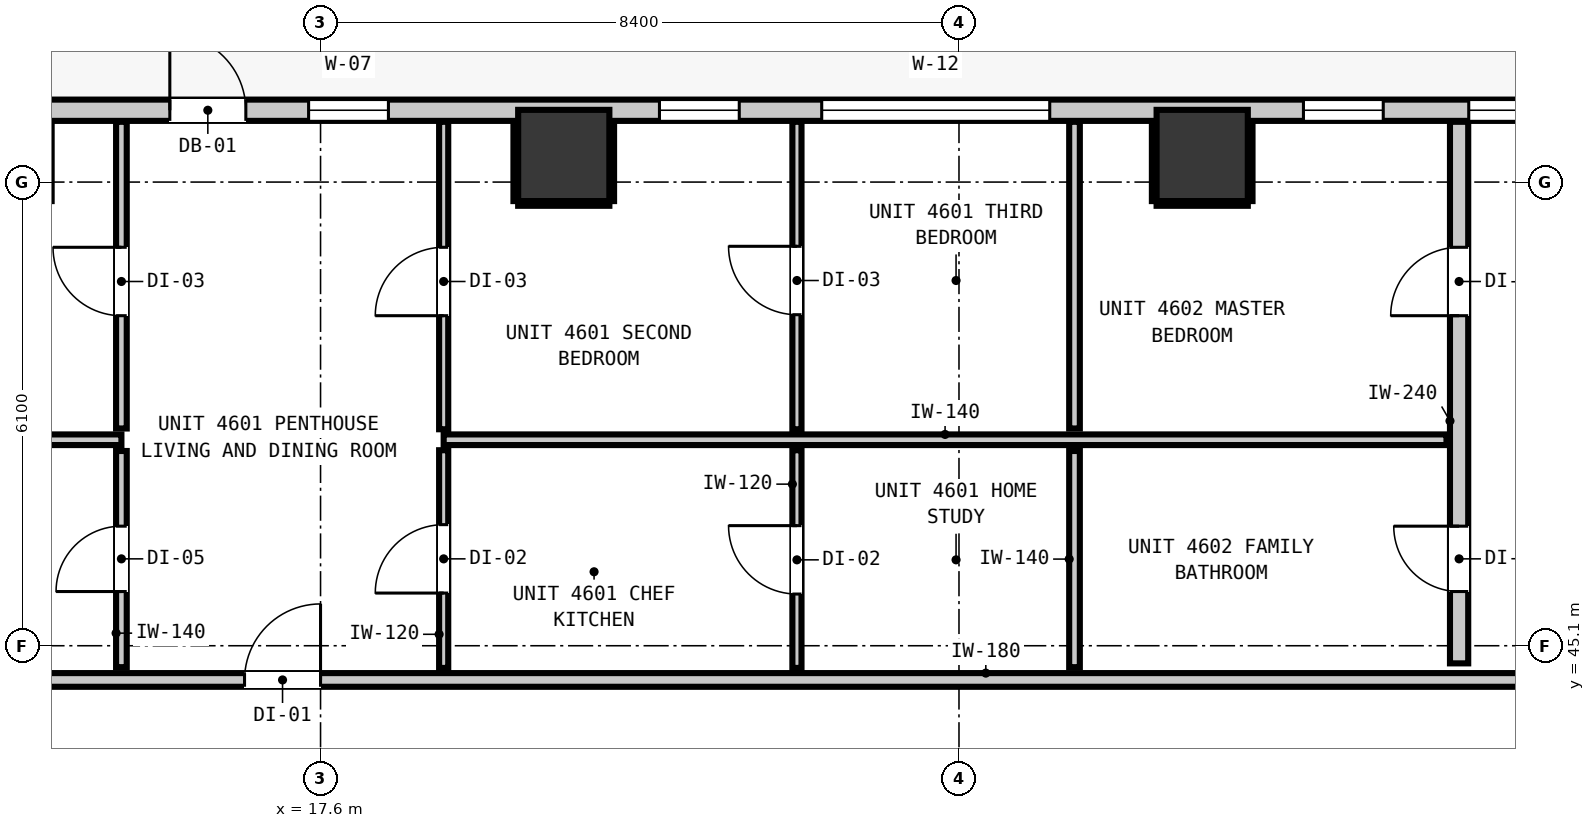
"""IFC4 building model, lengths in metres.
Left out: names, types, materials, properties, quantities, classifications, styles, units other than length and angle.
Written with IfcOpenShell. Run it as: python <this file> out.ifc"""

import sys

from ifc_helpers import new_model, si_unit, direction, frame, frame_2d, origin, origin_2d, place, context, subcontext, project, spatial, rectangle, extrude, element, fill, save


model = new_model("IFC4")
c1 = context("Model", 3, precision=1e-05, world=origin(), true_north=direction((0.0, 1.0)))
c2 = subcontext(c1, "Body", "Model", "MODEL_VIEW")
j1 = project(units=[si_unit("LENGTHUNIT", "METRE"), si_unit("PLANEANGLEUNIT", "RADIAN")], contexts=[c1])
p1 = place(None, origin())
s1 = spatial("IfcSite", under=j1, at=p1, CompositionType="ELEMENT")
p2 = place(p1, origin())
s2 = spatial("IfcBuilding", under=s1, at=p2, CompositionType="ELEMENT")
p3 = place(p2, frame((0.0, 0.0, 159.2)))
s3 = spatial("IfcBuildingStorey", under=s2, at=p3, CompositionType="ELEMENT", Elevation=159.2)
for number, where, z_axis, x_axis in (
    (1, (20.8, 51.55, 0.0), (0.0, 0.0, 1.0), (1.0, 0.0, 0.0)),
    (2, (29.2, 51.55, 0.0), (0.0, 0.0, 1.0), (1.0, 0.0, 0.0)),
):
    element("IfcColumn", number, at=place(p3, frame(where, z_axis=z_axis, x_axis=x_axis)), inside=s3, PredefinedType="COLUMN", context=c2, shape_type="SweptSolid", body=[
        extrude(rectangle(XDim=1.2, YDim=1.2, at=origin_2d()), origin(), (0.0, 0.0, 1.0), 3.32),
    ])
p4 = place(p3, frame((11.555, 52.145, 0.0), z_axis=(0.0, 0.0, 1.0), x_axis=(1.0, 0.0, 0.0)))
e3 = element("IfcWall", 3, at=p4, inside=s3, PredefinedType="STANDARD", context=c2, shape_type="SweptSolid", body=[
    extrude(rectangle(XDim=35.09, YDim=0.28, at=frame_2d((17.545, 0.0))), origin(), (0.0, 0.0, 1.0), 3.08),
])
p5 = place(p4, frame((4.062, 0.0, 0.0)))
e4 = element("IfcOpeningElement", 4, at=p5, cuts=e3, PredefinedType="OPENING", context=c2, shape_type="SweptSolid", body=[
    extrude(rectangle(XDim=1.0, YDim=2.15, at=frame_2d((0.5, 1.075))), frame((0.0, 0.15, 0.0), z_axis=(0.0, -1.0, 0.0), x_axis=(1.0, 0.0, 0.0)), (0.0, 0.0, 1.0), 0.3),
])
p6 = place(p4, frame((5.888, 0.0, 0.85)))
e5 = element("IfcOpeningElement", 5, at=p6, cuts=e3, PredefinedType="OPENING", context=c2, shape_type="SweptSolid", body=[
    extrude(rectangle(XDim=1.05, YDim=1.65, at=frame_2d((0.525, 0.825))), frame((0.0, 0.15, 0.0), z_axis=(0.0, -1.0, 0.0), x_axis=(1.0, 0.0, 0.0)), (0.0, 0.0, 1.0), 0.3),
])
p7 = place(p4, frame((0.378, 0.0, 0.85)))
e6 = element("IfcOpeningElement", 6, at=p7, cuts=e3, PredefinedType="OPENING", context=c2, shape_type="SweptSolid", body=[
    extrude(rectangle(XDim=0.58, YDim=1.5, at=frame_2d((0.29, 0.75))), frame((0.0, 0.15, 0.0), z_axis=(0.0, -1.0, 0.0), x_axis=(1.0, 0.0, 0.0)), (0.0, 0.0, 1.0), 0.3),
])
p8 = place(p4, frame((10.504, 0.0, 0.85)))
e7 = element("IfcOpeningElement", 7, at=p8, cuts=e3, PredefinedType="OPENING", context=c2, shape_type="SweptSolid", body=[
    extrude(rectangle(XDim=1.05, YDim=1.65, at=frame_2d((0.525, 0.825))), frame((0.0, 0.15, 0.0), z_axis=(0.0, -1.0, 0.0), x_axis=(1.0, 0.0, 0.0)), (0.0, 0.0, 1.0), 0.3),
])
p9 = place(p4, frame((12.639, 0.0, 0.85)))
e8 = element("IfcOpeningElement", 8, at=p9, cuts=e3, PredefinedType="OPENING", context=c2, shape_type="SweptSolid", body=[
    extrude(rectangle(XDim=3.0, YDim=2.1, at=frame_2d((1.5, 1.05))), frame((0.0, 0.15, 0.0), z_axis=(0.0, -1.0, 0.0), x_axis=(1.0, 0.0, 0.0)), (0.0, 0.0, 1.0), 0.3),
])
p10 = place(p4, frame((21.152, 0.0, 0.85)))
e9 = element("IfcOpeningElement", 9, at=p10, cuts=e3, PredefinedType="OPENING", context=c2, shape_type="SweptSolid", body=[
    extrude(rectangle(XDim=3.0, YDim=2.1, at=frame_2d((1.5, 1.05))), frame((0.0, 0.15, 0.0), z_axis=(0.0, -1.0, 0.0), x_axis=(1.0, 0.0, 0.0)), (0.0, 0.0, 1.0), 0.3),
])
p11 = place(p4, frame((18.977, 0.0, 0.85)))
e10 = element("IfcOpeningElement", 10, at=p11, cuts=e3, PredefinedType="OPENING", context=c2, shape_type="SweptSolid", body=[
    extrude(rectangle(XDim=1.05, YDim=1.65, at=frame_2d((0.525, 0.825))), frame((0.0, 0.15, 0.0), z_axis=(0.0, -1.0, 0.0), x_axis=(1.0, 0.0, 0.0)), (0.0, 0.0, 1.0), 0.3),
])
p12 = place(p4, frame((28.544, 0.0, 0.85)))
e11 = element("IfcOpeningElement", 11, at=p12, cuts=e3, PredefinedType="OPENING", context=c2, shape_type="SweptSolid", body=[
    extrude(rectangle(XDim=3.0, YDim=2.1, at=frame_2d((1.5, 1.05))), frame((0.0, 0.15, 0.0), z_axis=(0.0, -1.0, 0.0), x_axis=(1.0, 0.0, 0.0)), (0.0, 0.0, 1.0), 0.3),
])
p13 = place(p4, frame((33.447, 0.0, 0.85)))
e12 = element("IfcOpeningElement", 12, at=p13, cuts=e3, PredefinedType="OPENING", context=c2, shape_type="SweptSolid", body=[
    extrude(rectangle(XDim=1.05, YDim=1.65, at=frame_2d((0.525, 0.825))), frame((0.0, 0.15, 0.0), z_axis=(0.0, -1.0, 0.0), x_axis=(1.0, 0.0, 0.0)), (0.0, 0.0, 1.0), 0.3),
])
p14 = place(p3, frame((9.407, 44.65, 0.0), z_axis=(0.0, 0.0, 1.0), x_axis=(1.0, 0.0, 0.0)))
e13 = element("IfcWall", 13, at=p14, inside=s3, PredefinedType="PARTITIONING", context=c2, shape_type="SweptSolid", body=[
    extrude(rectangle(XDim=39.386, YDim=0.18, at=frame_2d((19.693, 0.0))), origin(), (0.0, 0.0, 1.0), 3.08),
])
p15 = place(p14, frame((7.193, 0.0, 0.0)))
e14 = element("IfcOpeningElement", 14, at=p15, cuts=e13, PredefinedType="OPENING", context=c2, shape_type="SweptSolid", body=[
    extrude(rectangle(XDim=1.0, YDim=2.15, at=frame_2d((0.5, 1.075))), frame((0.0, 0.1, 0.0), z_axis=(0.0, -1.0, 0.0), x_axis=(1.0, 0.0, 0.0)), (0.0, 0.0, 1.0), 0.2),
])
p16 = place(p14, frame((25.699, 0.0, 0.0)))
e15 = element("IfcOpeningElement", 15, at=p16, cuts=e13, PredefinedType="OPENING", context=c2, shape_type="SweptSolid", body=[
    extrude(rectangle(XDim=1.0, YDim=2.15, at=frame_2d((0.5, 1.075))), frame((0.0, 0.1, 0.0), z_axis=(0.0, -1.0, 0.0), x_axis=(1.0, 0.0, 0.0)), (0.0, 0.0, 1.0), 0.2),
])
p17 = place(p3, frame((9.407, 47.81, 0.0), z_axis=(0.0, 0.0, 1.0), x_axis=(1.0, 0.0, 0.0)))
e16 = element("IfcWall", 16, at=p17, inside=s3, PredefinedType="PARTITIONING", context=c2, shape_type="SweptSolid", body=[
    extrude(rectangle(XDim=5.573, YDim=0.14, at=frame_2d((2.787, 0.0))), origin(), (0.0, 0.0, 1.0), 3.08),
])
p18 = place(p3, frame((19.22, 47.81, 0.0), z_axis=(0.0, 0.0, 1.0), x_axis=(1.0, 0.0, 0.0)))
e17 = element("IfcWall", 17, at=p18, inside=s3, PredefinedType="PARTITIONING", context=c2, shape_type="SweptSolid", body=[
    extrude(rectangle(XDim=13.194, YDim=0.14, at=frame_2d((6.597, 0.0))), origin(), (0.0, 0.0, 1.0), 3.08),
])
p19 = place(p3, frame((32.58, 44.868, 0.0), z_axis=(0.0, 0.0, 1.0), x_axis=(0.0, 1.0, 0.0)))
e18 = element("IfcWall", 18, at=p19, inside=s3, PredefinedType="PARTITIONING", context=c2, shape_type="SweptSolid", body=[
    extrude(rectangle(XDim=7.125, YDim=0.24, at=frame_2d((3.562, 0.0))), origin(), (0.0, 0.0, 1.0), 3.08),
])
p20 = place(p19, frame((0.945, 0.0, 0.0)))
e19 = element("IfcOpeningElement", 19, at=p20, cuts=e18, PredefinedType="OPENING", context=c2, shape_type="SweptSolid", body=[
    extrude(rectangle(XDim=0.86, YDim=2.02, at=frame_2d((0.43, 1.01))), frame((0.0, 0.13, 0.0), z_axis=(0.0, -1.0, 0.0), x_axis=(1.0, 0.0, 0.0)), (0.0, 0.0, 1.0), 0.26),
])
p21 = place(p19, frame((4.574, 0.0, 0.0)))
e20 = element("IfcOpeningElement", 20, at=p21, cuts=e18, PredefinedType="OPENING", context=c2, shape_type="SweptSolid", body=[
    extrude(rectangle(XDim=0.9, YDim=2.1, at=frame_2d((0.45, 1.05))), frame((0.0, 0.13, 0.0), z_axis=(0.0, -1.0, 0.0), x_axis=(1.0, 0.0, 0.0)), (0.0, 0.0, 1.0), 0.26),
])
p22 = place(p3, frame((14.98, 44.818, 0.0), z_axis=(0.0, 0.0, 1.0), x_axis=(0.0, 1.0, 0.0)))
e21 = element("IfcWall", 21, at=p22, inside=s3, PredefinedType="PARTITIONING", context=c2, shape_type="SweptSolid", body=[
    extrude(rectangle(XDim=2.844, YDim=0.14, at=frame_2d((1.422, 0.0))), origin(), (0.0, 0.0, 1.0), 3.08),
])
p23 = place(p22, frame((0.995, 0.0, 0.0)))
e22 = element("IfcOpeningElement", 22, at=p23, cuts=e21, PredefinedType="OPENING", context=c2, shape_type="SweptSolid", body=[
    extrude(rectangle(XDim=0.86, YDim=2.02, at=frame_2d((0.43, 1.01))), frame((0.0, 0.08, 0.0), z_axis=(0.0, -1.0, 0.0), x_axis=(1.0, 0.0, 0.0)), (0.0, 0.0, 1.0), 0.16),
])
p24 = place(p3, frame((14.98, 47.958, 0.0), z_axis=(0.0, 0.0, 1.0), x_axis=(0.0, 1.0, 0.0)))
e23 = element("IfcWall", 23, at=p24, inside=s3, PredefinedType="PARTITIONING", context=c2, shape_type="SweptSolid", body=[
    extrude(rectangle(XDim=4.035, YDim=0.14, at=frame_2d((2.018, 0.0))), origin(), (0.0, 0.0, 1.0), 3.08),
])
p25 = place(p24, frame((1.484, 0.0, 0.0)))
e24 = element("IfcOpeningElement", 24, at=p25, cuts=e23, PredefinedType="OPENING", context=c2, shape_type="SweptSolid", body=[
    extrude(rectangle(XDim=0.9, YDim=2.1, at=frame_2d((0.45, 1.05))), frame((0.0, 0.08, 0.0), z_axis=(0.0, -1.0, 0.0), x_axis=(1.0, 0.0, 0.0)), (0.0, 0.0, 1.0), 0.16),
])
p26 = place(p3, frame((27.52, 44.818, 0.0), z_axis=(0.0, 0.0, 1.0), x_axis=(0.0, 1.0, 0.0)))
e25 = element("IfcWall", 25, at=p26, inside=s3, PredefinedType="PARTITIONING", context=c2, shape_type="SweptSolid", body=[
    extrude(rectangle(XDim=2.844, YDim=0.14, at=frame_2d((1.422, 0.0))), origin(), (0.0, 0.0, 1.0), 3.08),
])
p27 = place(p3, frame((27.52, 47.958, 0.0), z_axis=(0.0, 0.0, 1.0), x_axis=(0.0, 1.0, 0.0)))
e26 = element("IfcWall", 26, at=p27, inside=s3, PredefinedType="PARTITIONING", context=c2, shape_type="SweptSolid", body=[
    extrude(rectangle(XDim=4.035, YDim=0.14, at=frame_2d((2.018, 0.0))), origin(), (0.0, 0.0, 1.0), 3.08),
])
p28 = place(p3, frame((19.22, 44.808, 0.0), z_axis=(0.0, 0.0, 1.0), x_axis=(0.0, 1.0, 0.0)))
e27 = element("IfcWall", 27, at=p28, inside=s3, PredefinedType="PARTITIONING", context=c2, shape_type="SweptSolid", body=[
    extrude(rectangle(XDim=2.864, YDim=0.12, at=frame_2d((1.432, 0.0))), origin(), (0.0, 0.0, 1.0), 3.08),
])
p29 = place(p28, frame((0.985, 0.0, 0.0)))
e28 = element("IfcOpeningElement", 28, at=p29, cuts=e27, PredefinedType="OPENING", context=c2, shape_type="SweptSolid", body=[
    extrude(rectangle(XDim=0.9, YDim=2.1, at=frame_2d((0.45, 1.05))), frame((0.0, 0.07, 0.0), z_axis=(0.0, -1.0, 0.0), x_axis=(1.0, 0.0, 0.0)), (0.0, 0.0, 1.0), 0.14),
])
p30 = place(p3, frame((19.22, 47.948, 0.0), z_axis=(0.0, 0.0, 1.0), x_axis=(0.0, 1.0, 0.0)))
e29 = element("IfcWall", 29, at=p30, inside=s3, PredefinedType="PARTITIONING", context=c2, shape_type="SweptSolid", body=[
    extrude(rectangle(XDim=4.045, YDim=0.12, at=frame_2d((2.022, 0.0))), origin(), (0.0, 0.0, 1.0), 3.08),
])
p31 = place(p30, frame((1.494, 0.0, 0.0)))
e30 = element("IfcOpeningElement", 30, at=p31, cuts=e29, PredefinedType="OPENING", context=c2, shape_type="SweptSolid", body=[
    extrude(rectangle(XDim=0.9, YDim=2.1, at=frame_2d((0.45, 1.05))), frame((0.0, 0.07, 0.0), z_axis=(0.0, -1.0, 0.0), x_axis=(1.0, 0.0, 0.0)), (0.0, 0.0, 1.0), 0.14),
])
p32 = place(p3, frame((23.868, 44.808, 0.0), z_axis=(0.0, 0.0, 1.0), x_axis=(0.0, 1.0, 0.0)))
e31 = element("IfcWall", 31, at=p32, inside=s3, PredefinedType="PARTITIONING", context=c2, shape_type="SweptSolid", body=[
    extrude(rectangle(XDim=2.864, YDim=0.12, at=frame_2d((1.432, 0.0))), origin(), (0.0, 0.0, 1.0), 3.08),
])
p33 = place(p32, frame((0.972, 0.0, 0.0)))
e32 = element("IfcOpeningElement", 32, at=p33, cuts=e31, PredefinedType="OPENING", context=c2, shape_type="SweptSolid", body=[
    extrude(rectangle(XDim=0.9, YDim=2.1, at=frame_2d((0.45, 1.05))), frame((0.0, 0.07, 0.0), z_axis=(0.0, -1.0, 0.0), x_axis=(1.0, 0.0, 0.0)), (0.0, 0.0, 1.0), 0.14),
])
p34 = place(p3, frame((23.868, 47.948, 0.0), z_axis=(0.0, 0.0, 1.0), x_axis=(0.0, 1.0, 0.0)))
e33 = element("IfcWall", 33, at=p34, inside=s3, PredefinedType="PARTITIONING", context=c2, shape_type="SweptSolid", body=[
    extrude(rectangle(XDim=4.045, YDim=0.12, at=frame_2d((2.022, 0.0))), origin(), (0.0, 0.0, 1.0), 3.08),
])
p35 = place(p34, frame((1.507, 0.0, 0.0)))
e34 = element("IfcOpeningElement", 34, at=p35, cuts=e33, PredefinedType="OPENING", context=c2, shape_type="SweptSolid", body=[
    extrude(rectangle(XDim=0.9, YDim=2.1, at=frame_2d((0.45, 1.05))), frame((0.0, 0.07, 0.0), z_axis=(0.0, -1.0, 0.0), x_axis=(1.0, 0.0, 0.0)), (0.0, 0.0, 1.0), 0.14),
])
p36 = place(p3, frame((20.2, 50.918, 0.0), z_axis=(0.0, 0.0, 1.0), x_axis=(1.0, 0.0, 0.0)))
e35 = element("IfcWall", 35, at=p36, inside=s3, PredefinedType="PARTITIONING", context=c2, shape_type="SweptSolid", body=[
    extrude(rectangle(XDim=1.2, YDim=0.06, at=frame_2d((0.6, 0.0))), origin(), (0.0, 0.0, 1.0), 1.45),
])
for number, where, z_axis, x_axis in (
    (36, (20.168, 50.95, 0.0), (0.0, 0.0, 1.0), (0.0, 1.0, 0.0)),
    (37, (21.432, 50.95, 0.0), (0.0, 0.0, 1.0), (0.0, 1.0, 0.0)),
):
    element("IfcWall", number, at=place(p3, frame(where, z_axis=z_axis, x_axis=x_axis)), inside=s3, PredefinedType="PARTITIONING", context=c2, shape_type="SweptSolid", body=[
        extrude(rectangle(XDim=1.04, YDim=0.06, at=frame_2d((0.52, 0.0))), origin(), (0.0, 0.0, 1.0), 1.45),
    ])
p37 = place(p3, frame((28.6, 50.918, 0.0), z_axis=(0.0, 0.0, 1.0), x_axis=(1.0, 0.0, 0.0)))
e38 = element("IfcWall", 38, at=p37, inside=s3, PredefinedType="PARTITIONING", context=c2, shape_type="SweptSolid", body=[
    extrude(rectangle(XDim=1.2, YDim=0.06, at=frame_2d((0.6, 0.0))), origin(), (0.0, 0.0, 1.0), 1.45),
])
for number, where, z_axis, x_axis in (
    (39, (28.568, 50.95, 0.0), (0.0, 0.0, 1.0), (0.0, 1.0, 0.0)),
    (40, (29.832, 50.95, 0.0), (0.0, 0.0, 1.0), (0.0, 1.0, 0.0)),
):
    element("IfcWall", number, at=place(p3, frame(where, z_axis=z_axis, x_axis=x_axis)), inside=s3, PredefinedType="PARTITIONING", context=c2, shape_type="SweptSolid", body=[
        extrude(rectangle(XDim=1.04, YDim=0.06, at=frame_2d((0.52, 0.0))), origin(), (0.0, 0.0, 1.0), 1.45),
    ])
p38 = place(p5, origin())
e41 = element("IfcDoor", 41, at=p38, inside=s3, OperationType="SINGLE_SWING_LEFT", PredefinedType="DOOR", context=c2, shape_type="SweptSolid", body=[
    extrude(rectangle(XDim=1.0, YDim=2.15, at=frame_2d((0.5, 1.075))), frame((0.0, 0.025, 0.0), z_axis=(0.0, -1.0, 0.0), x_axis=(1.0, 0.0, 0.0)), (0.0, 0.0, 1.0), 0.05),
])
fill(e4, e41)
p39 = place(p6, origin())
e42 = element("IfcWindow", 42, at=p39, inside=s3, PartitioningType="SINGLE_PANEL", PredefinedType="WINDOW", context=c2, shape_type="SweptSolid", body=[
    extrude(rectangle(XDim=1.05, YDim=1.65, at=frame_2d((0.525, 0.825))), frame((0.0, 0.03, 0.0), z_axis=(0.0, -1.0, 0.0), x_axis=(1.0, 0.0, 0.0)), (0.0, 0.0, 1.0), 0.06),
])
fill(e5, e42)
p40 = place(p8, origin())
e43 = element("IfcWindow", 43, at=p40, inside=s3, PartitioningType="SINGLE_PANEL", PredefinedType="WINDOW", context=c2, shape_type="SweptSolid", body=[
    extrude(rectangle(XDim=1.05, YDim=1.65, at=frame_2d((0.525, 0.825))), frame((0.0, 0.03, 0.0), z_axis=(0.0, -1.0, 0.0), x_axis=(1.0, 0.0, 0.0)), (0.0, 0.0, 1.0), 0.06),
])
fill(e7, e43)
p41 = place(p9, origin())
e44 = element("IfcWindow", 44, at=p41, inside=s3, PartitioningType="SINGLE_PANEL", PredefinedType="WINDOW", context=c2, shape_type="SweptSolid", body=[
    extrude(rectangle(XDim=3.0, YDim=2.1, at=frame_2d((1.5, 1.05))), frame((0.0, 0.03, 0.0), z_axis=(0.0, -1.0, 0.0), x_axis=(1.0, 0.0, 0.0)), (0.0, 0.0, 1.0), 0.06),
])
fill(e8, e44)
p42 = place(p10, origin())
e45 = element("IfcWindow", 45, at=p42, inside=s3, PartitioningType="SINGLE_PANEL", PredefinedType="WINDOW", context=c2, shape_type="SweptSolid", body=[
    extrude(rectangle(XDim=3.0, YDim=2.1, at=frame_2d((1.5, 1.05))), frame((0.0, 0.03, 0.0), z_axis=(0.0, -1.0, 0.0), x_axis=(1.0, 0.0, 0.0)), (0.0, 0.0, 1.0), 0.06),
])
fill(e9, e45)
p43 = place(p11, origin())
e46 = element("IfcWindow", 46, at=p43, inside=s3, PartitioningType="SINGLE_PANEL", PredefinedType="WINDOW", context=c2, shape_type="SweptSolid", body=[
    extrude(rectangle(XDim=1.05, YDim=1.65, at=frame_2d((0.525, 0.825))), frame((0.0, 0.03, 0.0), z_axis=(0.0, -1.0, 0.0), x_axis=(1.0, 0.0, 0.0)), (0.0, 0.0, 1.0), 0.06),
])
fill(e10, e46)
p44 = place(p15, origin())
e47 = element("IfcDoor", 47, at=p44, inside=s3, OperationType="SINGLE_SWING_RIGHT", PredefinedType="DOOR", context=c2, shape_type="SweptSolid", body=[
    extrude(rectangle(XDim=1.0, YDim=2.15, at=frame_2d((0.5, 1.075))), frame((0.0, 0.025, 0.0), z_axis=(0.0, -1.0, 0.0), x_axis=(1.0, 0.0, 0.0)), (0.0, 0.0, 1.0), 0.05),
])
fill(e14, e47)
p45 = place(p23, origin())
e48 = element("IfcDoor", 48, at=p45, inside=s3, OperationType="SINGLE_SWING_LEFT", PredefinedType="DOOR", context=c2, shape_type="SweptSolid", body=[
    extrude(rectangle(XDim=0.86, YDim=2.02, at=frame_2d((0.43, 1.01))), frame((0.0, 0.025, 0.0), z_axis=(0.0, -1.0, 0.0), x_axis=(1.0, 0.0, 0.0)), (0.0, 0.0, 1.0), 0.05),
])
fill(e22, e48)
p46 = place(p25, origin())
e49 = element("IfcDoor", 49, at=p46, inside=s3, OperationType="SINGLE_SWING_RIGHT", PredefinedType="DOOR", context=c2, shape_type="SweptSolid", body=[
    extrude(rectangle(XDim=0.9, YDim=2.1, at=frame_2d((0.45, 1.05))), frame((0.0, 0.025, 0.0), z_axis=(0.0, -1.0, 0.0), x_axis=(1.0, 0.0, 0.0)), (0.0, 0.0, 1.0), 0.05),
])
fill(e24, e49)
p47 = place(p29, origin())
e50 = element("IfcDoor", 50, at=p47, inside=s3, OperationType="SINGLE_SWING_LEFT", PredefinedType="DOOR", context=c2, shape_type="SweptSolid", body=[
    extrude(rectangle(XDim=0.9, YDim=2.1, at=frame_2d((0.45, 1.05))), frame((0.0, 0.025, 0.0), z_axis=(0.0, -1.0, 0.0), x_axis=(1.0, 0.0, 0.0)), (0.0, 0.0, 1.0), 0.05),
])
fill(e28, e50)
p48 = place(p33, origin())
e51 = element("IfcDoor", 51, at=p48, inside=s3, OperationType="SINGLE_SWING_RIGHT", PredefinedType="DOOR", context=c2, shape_type="SweptSolid", body=[
    extrude(rectangle(XDim=0.9, YDim=2.1, at=frame_2d((0.45, 1.05))), frame((0.0, 0.025, 0.0), z_axis=(0.0, -1.0, 0.0), x_axis=(1.0, 0.0, 0.0)), (0.0, 0.0, 1.0), 0.05),
])
fill(e32, e51)
p49 = place(p31, origin())
e52 = element("IfcDoor", 52, at=p49, inside=s3, OperationType="SINGLE_SWING_LEFT", PredefinedType="DOOR", context=c2, shape_type="SweptSolid", body=[
    extrude(rectangle(XDim=0.9, YDim=2.1, at=frame_2d((0.45, 1.05))), frame((0.0, 0.025, 0.0), z_axis=(0.0, -1.0, 0.0), x_axis=(1.0, 0.0, 0.0)), (0.0, 0.0, 1.0), 0.05),
])
fill(e30, e52)
p50 = place(p35, origin())
e53 = element("IfcDoor", 53, at=p50, inside=s3, OperationType="SINGLE_SWING_RIGHT", PredefinedType="DOOR", context=c2, shape_type="SweptSolid", body=[
    extrude(rectangle(XDim=0.9, YDim=2.1, at=frame_2d((0.45, 1.05))), frame((0.0, 0.025, 0.0), z_axis=(0.0, -1.0, 0.0), x_axis=(1.0, 0.0, 0.0)), (0.0, 0.0, 1.0), 0.05),
])
fill(e34, e53)
p51 = place(p20, origin())
e54 = element("IfcDoor", 54, at=p51, inside=s3, OperationType="SINGLE_SWING_RIGHT", PredefinedType="DOOR", context=c2, shape_type="SweptSolid", body=[
    extrude(rectangle(XDim=0.86, YDim=2.02, at=frame_2d((0.43, 1.01))), frame((0.0, 0.025, 0.0), z_axis=(0.0, -1.0, 0.0), x_axis=(1.0, 0.0, 0.0)), (0.0, 0.0, 1.0), 0.05),
])
fill(e19, e54)
p52 = place(p21, origin())
e55 = element("IfcDoor", 55, at=p52, inside=s3, OperationType="SINGLE_SWING_LEFT", PredefinedType="DOOR", context=c2, shape_type="SweptSolid", body=[
    extrude(rectangle(XDim=0.9, YDim=2.1, at=frame_2d((0.45, 1.05))), frame((0.0, 0.025, 0.0), z_axis=(0.0, -1.0, 0.0), x_axis=(1.0, 0.0, 0.0)), (0.0, 0.0, 1.0), 0.05),
])
fill(e20, e55)
save(model, sys.argv[1])
